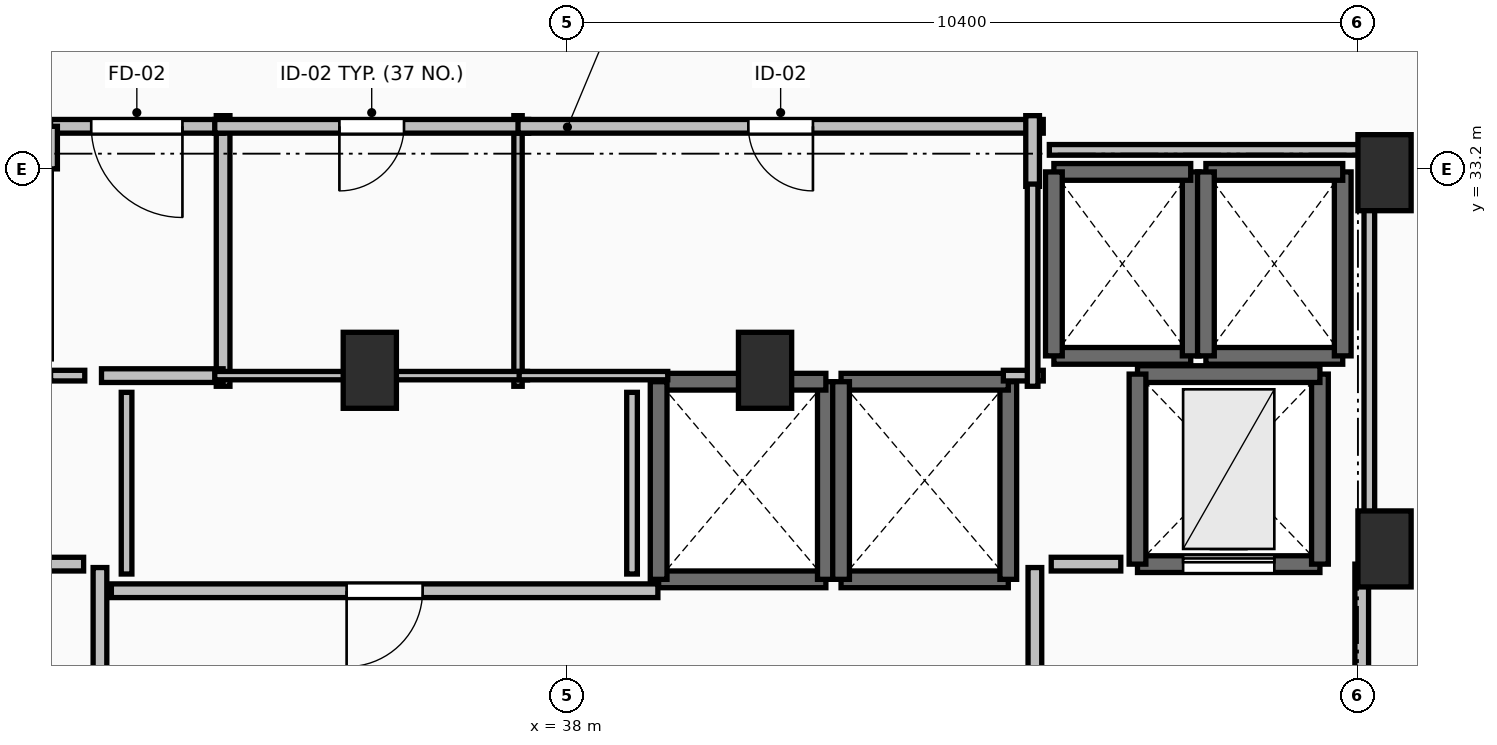
"""IFC4 building model, lengths in metres.
Left out: names, types, materials, properties, quantities, classifications, styles, units other than length and angle.
Written with IfcOpenShell. Run it as: python <this file> out.ifc"""

import sys

from ifc_helpers import new_model, si_unit, direction, frame, frame_2d, origin, origin_2d, place, context, subcontext, project, spatial, rectangle, extrude, element, fill, save


model = new_model("IFC4")
c1 = context("Model", 3, precision=1e-05, world=origin(), true_north=direction((0.0, 1.0)))
c2 = subcontext(c1, "Body", "Model", "MODEL_VIEW")
j1 = project(units=[si_unit("LENGTHUNIT", "METRE"), si_unit("PLANEANGLEUNIT", "RADIAN")], contexts=[c1])
p1 = place(None, origin())
s1 = spatial("IfcSite", under=j1, at=p1, CompositionType="ELEMENT")
p2 = place(p1, origin())
s2 = spatial("IfcBuilding", under=s1, at=p2, CompositionType="ELEMENT")
p3 = place(p2, frame((0.0, 0.0, 179.1)))
s3 = spatial("IfcBuildingStorey", under=s2, at=p3, CompositionType="ELEMENT", Elevation=179.1)
for number, where, z_axis, x_axis in (
    (1, (48.75, 33.15, 0.0), (0.0, 0.0, 1.0), (1.0, 0.0, 0.0)),
    (2, (48.75, 28.2, 0.0), (0.0, 0.0, 1.0), (1.0, 0.0, 0.0)),
    (3, (35.4, 30.55, 0.0), (0.0, 0.0, 1.0), (1.0, 0.0, 0.0)),
    (4, (40.6, 30.55, 0.0), (0.0, 0.0, 1.0), (1.0, 0.0, 0.0)),
):
    element("IfcColumn", number, at=place(p3, frame(where, z_axis=z_axis, x_axis=x_axis)), inside=s3, PredefinedType="PILASTER", context=c2, shape_type="SweptSolid", body=[
        extrude(rectangle(XDim=0.7, YDim=1.0, at=origin_2d()), origin(), (0.0, 0.0, 1.0), 3.5),
    ])
p4 = place(p3, frame((39.2, 27.8, 0.0), z_axis=(0.0, 0.0, 1.0), x_axis=(1.0, 0.0, 0.0)))
e5 = element("IfcWall", 5, at=p4, inside=s3, PredefinedType="SOLIDWALL", context=c2, shape_type="SweptSolid", body=[
    extrude(rectangle(XDim=2.2, YDim=0.22, at=frame_2d((1.1, 0.0))), origin(), (0.0, 0.0, 1.0), 3.24),
])
p5 = place(p3, frame((41.4, 27.8, 0.0), z_axis=(0.0, 0.0, 1.0), x_axis=(0.0, 1.0, 0.0)))
e6 = element("IfcWall", 6, at=p5, inside=s3, PredefinedType="SOLIDWALL", context=c2, shape_type="SweptSolid", body=[
    extrude(rectangle(XDim=2.6, YDim=0.22, at=frame_2d((1.3, 0.0))), origin(), (0.0, 0.0, 1.0), 3.24),
])
p6 = place(p3, frame((41.4, 30.4, 0.0), z_axis=(0.0, 0.0, 1.0), x_axis=(-1.0, 0.0, 0.0)))
e7 = element("IfcWall", 7, at=p6, inside=s3, PredefinedType="SOLIDWALL", context=c2, shape_type="SweptSolid", body=[
    extrude(rectangle(XDim=2.2, YDim=0.22, at=frame_2d((1.1, 0.0))), origin(), (0.0, 0.0, 1.0), 3.24),
])
p7 = place(p3, frame((39.2, 30.4, 0.0), z_axis=(0.0, 0.0, 1.0), x_axis=(0.0, -1.0, 0.0)))
e8 = element("IfcWall", 8, at=p7, inside=s3, PredefinedType="SOLIDWALL", context=c2, shape_type="SweptSolid", body=[
    extrude(rectangle(XDim=2.6, YDim=0.22, at=frame_2d((1.3, 0.0))), origin(), (0.0, 0.0, 1.0), 3.24),
])
p8 = place(p3, frame((41.6, 27.8, 0.0), z_axis=(0.0, 0.0, 1.0), x_axis=(1.0, 0.0, 0.0)))
e9 = element("IfcWall", 9, at=p8, inside=s3, PredefinedType="SOLIDWALL", context=c2, shape_type="SweptSolid", body=[
    extrude(rectangle(XDim=2.2, YDim=0.22, at=frame_2d((1.1, 0.0))), origin(), (0.0, 0.0, 1.0), 3.24),
])
p9 = place(p3, frame((43.8, 27.8, 0.0), z_axis=(0.0, 0.0, 1.0), x_axis=(0.0, 1.0, 0.0)))
e10 = element("IfcWall", 10, at=p9, inside=s3, PredefinedType="SOLIDWALL", context=c2, shape_type="SweptSolid", body=[
    extrude(rectangle(XDim=2.6, YDim=0.22, at=frame_2d((1.3, 0.0))), origin(), (0.0, 0.0, 1.0), 3.24),
])
p10 = place(p3, frame((43.8, 30.4, 0.0), z_axis=(0.0, 0.0, 1.0), x_axis=(-1.0, 0.0, 0.0)))
e11 = element("IfcWall", 11, at=p10, inside=s3, PredefinedType="SOLIDWALL", context=c2, shape_type="SweptSolid", body=[
    extrude(rectangle(XDim=2.2, YDim=0.22, at=frame_2d((1.1, 0.0))), origin(), (0.0, 0.0, 1.0), 3.24),
])
p11 = place(p3, frame((41.6, 30.4, 0.0), z_axis=(0.0, 0.0, 1.0), x_axis=(0.0, -1.0, 0.0)))
e12 = element("IfcWall", 12, at=p11, inside=s3, PredefinedType="SOLIDWALL", context=c2, shape_type="SweptSolid", body=[
    extrude(rectangle(XDim=2.6, YDim=0.22, at=frame_2d((1.3, 0.0))), origin(), (0.0, 0.0, 1.0), 3.24),
])
p12 = place(p3, frame((44.4, 30.74, 0.0), z_axis=(0.0, 0.0, 1.0), x_axis=(1.0, 0.0, 0.0)))
e13 = element("IfcWall", 13, at=p12, inside=s3, PredefinedType="SOLIDWALL", context=c2, shape_type="SweptSolid", body=[
    extrude(rectangle(XDim=1.8, YDim=0.22, at=frame_2d((0.9, 0.0))), origin(), (0.0, 0.0, 1.0), 3.24),
])
p13 = place(p3, frame((46.2, 30.74, 0.0), z_axis=(0.0, 0.0, 1.0), x_axis=(0.0, 1.0, 0.0)))
e14 = element("IfcWall", 14, at=p13, inside=s3, PredefinedType="SOLIDWALL", context=c2, shape_type="SweptSolid", body=[
    extrude(rectangle(XDim=2.42, YDim=0.22, at=frame_2d((1.21, 0.0))), origin(), (0.0, 0.0, 1.0), 3.24),
])
p14 = place(p3, frame((46.2, 33.16, 0.0), z_axis=(0.0, 0.0, 1.0), x_axis=(-1.0, 0.0, 0.0)))
e15 = element("IfcWall", 15, at=p14, inside=s3, PredefinedType="SOLIDWALL", context=c2, shape_type="SweptSolid", body=[
    extrude(rectangle(XDim=1.8, YDim=0.22, at=frame_2d((0.9, 0.0))), origin(), (0.0, 0.0, 1.0), 3.24),
])
p15 = place(p3, frame((44.4, 33.16, 0.0), z_axis=(0.0, 0.0, 1.0), x_axis=(0.0, -1.0, 0.0)))
e16 = element("IfcWall", 16, at=p15, inside=s3, PredefinedType="SOLIDWALL", context=c2, shape_type="SweptSolid", body=[
    extrude(rectangle(XDim=2.42, YDim=0.22, at=frame_2d((1.21, 0.0))), origin(), (0.0, 0.0, 1.0), 3.24),
])
p16 = place(p3, frame((46.4, 30.74, 0.0), z_axis=(0.0, 0.0, 1.0), x_axis=(1.0, 0.0, 0.0)))
e17 = element("IfcWall", 17, at=p16, inside=s3, PredefinedType="SOLIDWALL", context=c2, shape_type="SweptSolid", body=[
    extrude(rectangle(XDim=1.8, YDim=0.22, at=frame_2d((0.9, 0.0))), origin(), (0.0, 0.0, 1.0), 3.24),
])
p17 = place(p3, frame((48.2, 30.74, 0.0), z_axis=(0.0, 0.0, 1.0), x_axis=(0.0, 1.0, 0.0)))
e18 = element("IfcWall", 18, at=p17, inside=s3, PredefinedType="SOLIDWALL", context=c2, shape_type="SweptSolid", body=[
    extrude(rectangle(XDim=2.42, YDim=0.22, at=frame_2d((1.21, 0.0))), origin(), (0.0, 0.0, 1.0), 3.24),
])
p18 = place(p3, frame((48.2, 33.16, 0.0), z_axis=(0.0, 0.0, 1.0), x_axis=(-1.0, 0.0, 0.0)))
e19 = element("IfcWall", 19, at=p18, inside=s3, PredefinedType="SOLIDWALL", context=c2, shape_type="SweptSolid", body=[
    extrude(rectangle(XDim=1.8, YDim=0.22, at=frame_2d((0.9, 0.0))), origin(), (0.0, 0.0, 1.0), 3.24),
])
p19 = place(p3, frame((46.4, 33.16, 0.0), z_axis=(0.0, 0.0, 1.0), x_axis=(0.0, -1.0, 0.0)))
e20 = element("IfcWall", 20, at=p19, inside=s3, PredefinedType="SOLIDWALL", context=c2, shape_type="SweptSolid", body=[
    extrude(rectangle(XDim=2.42, YDim=0.22, at=frame_2d((1.21, 0.0))), origin(), (0.0, 0.0, 1.0), 3.24),
])
p20 = place(p3, frame((45.5, 28.0, 0.0), z_axis=(0.0, 0.0, 1.0), x_axis=(1.0, 0.0, 0.0)))
e21 = element("IfcWall", 21, at=p20, inside=s3, PredefinedType="SHEAR", context=c2, shape_type="SweptSolid", body=[
    extrude(rectangle(XDim=2.4, YDim=0.22, at=frame_2d((1.2, 0.0))), origin(), (0.0, 0.0, 1.0), 3.24),
])
p21 = place(p20, frame((0.6, 0.0, 0.0)))
e22 = element("IfcOpeningElement", 22, at=p21, cuts=e21, PredefinedType="OPENING", context=c2, shape_type="SweptSolid", body=[
    extrude(rectangle(XDim=1.2, YDim=2.2, at=frame_2d((0.6, 1.1))), frame((0.0, 0.125, 0.0), z_axis=(0.0, -1.0, 0.0), x_axis=(1.0, 0.0, 0.0)), (0.0, 0.0, 1.0), 0.25),
])
p22 = place(p3, frame((47.9, 28.0, 0.0), z_axis=(0.0, 0.0, 1.0), x_axis=(0.0, 1.0, 0.0)))
e23 = element("IfcWall", 23, at=p22, inside=s3, PredefinedType="SHEAR", context=c2, shape_type="SweptSolid", body=[
    extrude(rectangle(XDim=2.5, YDim=0.22, at=frame_2d((1.25, 0.0))), origin(), (0.0, 0.0, 1.0), 3.24),
])
p23 = place(p3, frame((47.9, 30.5, 0.0), z_axis=(0.0, 0.0, 1.0), x_axis=(-1.0, 0.0, 0.0)))
e24 = element("IfcWall", 24, at=p23, inside=s3, PredefinedType="SHEAR", context=c2, shape_type="SweptSolid", body=[
    extrude(rectangle(XDim=2.4, YDim=0.22, at=frame_2d((1.2, 0.0))), origin(), (0.0, 0.0, 1.0), 3.24),
])
p24 = place(p3, frame((45.5, 30.5, 0.0), z_axis=(0.0, 0.0, 1.0), x_axis=(0.0, -1.0, 0.0)))
e25 = element("IfcWall", 25, at=p24, inside=s3, PredefinedType="SHEAR", context=c2, shape_type="SweptSolid", body=[
    extrude(rectangle(XDim=2.5, YDim=0.22, at=frame_2d((1.25, 0.0))), origin(), (0.0, 0.0, 1.0), 3.24),
])
p25 = place(p3, frame((31.85, 24.045, 0.0), z_axis=(0.0, 0.0, 1.0), x_axis=(0.0, 1.0, 0.0)))
e26 = element("IfcWall", 26, at=p25, inside=s3, PredefinedType="PARTITIONING", context=c2, shape_type="SweptSolid", body=[
    extrude(rectangle(XDim=3.91, YDim=0.18, at=frame_2d((1.955, 0.0))), origin(), (0.0, 0.0, 1.0), 3.24),
])
p26 = place(p25, frame((1.355, 0.0, 0.0)))
e27 = element("IfcOpeningElement", 27, at=p26, cuts=e26, PredefinedType="OPENING", context=c2, shape_type="SweptSolid", body=[
    extrude(rectangle(XDim=1.2, YDim=2.15, at=frame_2d((0.6, 1.075))), frame((0.0, 0.105, 0.0), z_axis=(0.0, -1.0, 0.0), x_axis=(1.0, 0.0, 0.0)), (0.0, 0.0, 1.0), 0.21),
])
p27 = place(p3, frame((44.15, 27.955, 0.0), z_axis=(0.0, 0.0, 1.0), x_axis=(0.0, -1.0, 0.0)))
e28 = element("IfcWall", 28, at=p27, inside=s3, PredefinedType="PARTITIONING", context=c2, shape_type="SweptSolid", body=[
    extrude(rectangle(XDim=3.91, YDim=0.18, at=frame_2d((1.955, 0.0))), origin(), (0.0, 0.0, 1.0), 3.24),
])
p28 = place(p27, frame((1.355, 0.0, 0.0)))
e29 = element("IfcOpeningElement", 29, at=p28, cuts=e28, PredefinedType="OPENING", context=c2, shape_type="SweptSolid", body=[
    extrude(rectangle(XDim=1.2, YDim=2.15, at=frame_2d((0.6, 1.075))), frame((0.0, 0.105, 0.0), z_axis=(0.0, -1.0, 0.0), x_axis=(1.0, 0.0, 0.0)), (0.0, 0.0, 1.0), 0.21),
])
p29 = place(p3, frame((48.45, 23.95, 0.0), z_axis=(0.0, 0.0, 1.0), x_axis=(0.0, 1.0, 0.0)))
e30 = element("IfcWall", 30, at=p29, inside=s3, PredefinedType="PARTITIONING", context=c2, shape_type="SweptSolid", body=[
    extrude(rectangle(XDim=4.05, YDim=0.18, at=frame_2d((2.025, 0.0))), origin(), (0.0, 0.0, 1.0), 3.24),
])
p30 = place(p29, frame((1.425, 0.0, 0.0)))
e31 = element("IfcOpeningElement", 31, at=p30, cuts=e30, PredefinedType="OPENING", context=c2, shape_type="SweptSolid", body=[
    extrude(rectangle(XDim=1.2, YDim=2.15, at=frame_2d((0.6, 1.075))), frame((0.0, 0.105, 0.0), z_axis=(0.0, -1.0, 0.0), x_axis=(1.0, 0.0, 0.0)), (0.0, 0.0, 1.0), 0.21),
])
p31 = place(p3, frame((33.47, 30.34, 0.0), z_axis=(0.0, 0.0, 1.0), x_axis=(0.0, 1.0, 0.0)))
e32 = element("IfcWall", 32, at=p31, inside=s3, PredefinedType="PARTITIONING", context=c2, shape_type="SweptSolid", body=[
    extrude(rectangle(XDim=3.56, YDim=0.18, at=frame_2d((1.78, 0.0))), origin(), (0.0, 0.0, 1.0), 3.24),
])
p32 = place(p3, frame((31.87, 30.48, 0.0), z_axis=(0.0, 0.0, 1.0), x_axis=(1.0, 0.0, 0.0)))
e33 = element("IfcWall", 33, at=p32, inside=s3, PredefinedType="PARTITIONING", context=c2, shape_type="SweptSolid", body=[
    extrude(rectangle(XDim=1.6, YDim=0.18, at=frame_2d((0.8, 0.0))), origin(), (0.0, 0.0, 1.0), 3.24),
])
p33 = place(p3, frame((33.47, 33.76, 0.0), z_axis=(0.0, 0.0, 1.0), x_axis=(-1.0, 0.0, 0.0)))
e34 = element("IfcWall", 34, at=p33, inside=s3, PredefinedType="PARTITIONING", context=c2, shape_type="SweptSolid", body=[
    extrude(rectangle(XDim=2.27, YDim=0.18, at=frame_2d((1.135, 0.0))), origin(), (0.0, 0.0, 1.0), 3.24),
])
p34 = place(p33, frame((0.535, 0.0, 0.0)))
e35 = element("IfcOpeningElement", 35, at=p34, cuts=e34, PredefinedType="OPENING", context=c2, shape_type="SweptSolid", body=[
    extrude(rectangle(XDim=1.2, YDim=2.15, at=frame_2d((0.6, 1.075))), frame((0.0, 0.105, 0.0), z_axis=(0.0, -1.0, 0.0), x_axis=(1.0, 0.0, 0.0)), (0.0, 0.0, 1.0), 0.21),
])
p35 = place(p3, frame((31.2, 33.76, 0.0), z_axis=(0.0, 0.0, 1.0), x_axis=(0.0, -1.0, 0.0)))
e36 = element("IfcWall", 36, at=p35, inside=s3, PredefinedType="PARTITIONING", context=c2, shape_type="SweptSolid", body=[
    extrude(rectangle(XDim=0.56, YDim=0.18, at=frame_2d((0.28, 0.0))), origin(), (0.0, 0.0, 1.0), 3.24),
])
p36 = place(p3, frame((39.19, 27.65, 0.0), z_axis=(0.0, 0.0, 1.0), x_axis=(-1.0, 0.0, 0.0)))
e37 = element("IfcWall", 37, at=p36, inside=s3, PredefinedType="PARTITIONING", context=c2, shape_type="SweptSolid", body=[
    extrude(rectangle(XDim=7.19, YDim=0.18, at=frame_2d((3.595, 0.0))), origin(), (0.0, 0.0, 1.0), 3.24),
])
p37 = place(p36, frame((3.095, 0.0, 0.0)))
e38 = element("IfcOpeningElement", 38, at=p37, cuts=e37, PredefinedType="OPENING", context=c2, shape_type="SweptSolid", body=[
    extrude(rectangle(XDim=1.0, YDim=2.15, at=frame_2d((0.5, 1.075))), frame((0.0, 0.105, 0.0), z_axis=(0.0, -1.0, 0.0), x_axis=(1.0, 0.0, 0.0)), (0.0, 0.0, 1.0), 0.21),
])
p38 = place(p3, frame((37.35, 30.34, 0.0), z_axis=(0.0, 0.0, 1.0), x_axis=(0.0, 1.0, 0.0)))
e39 = element("IfcWall", 39, at=p38, inside=s3, PredefinedType="PARTITIONING", context=c2, shape_type="SweptSolid", body=[
    extrude(rectangle(XDim=3.56, YDim=0.11, at=frame_2d((1.78, 0.0))), origin(), (0.0, 0.0, 1.0), 2.432),
])
p39 = place(p3, frame((33.36, 30.48, 0.0), z_axis=(0.0, 0.0, 1.0), x_axis=(1.0, 0.0, 0.0)))
e40 = element("IfcWall", 40, at=p39, inside=s3, PredefinedType="PARTITIONING", context=c2, shape_type="SweptSolid", body=[
    extrude(rectangle(XDim=4.115, YDim=0.11, at=frame_2d((2.058, 0.0))), origin(), (0.0, 0.0, 1.0), 2.432),
])
p40 = place(p3, frame((37.49, 33.76, 0.0), z_axis=(0.0, 0.0, 1.0), x_axis=(-1.0, 0.0, 0.0)))
e41 = element("IfcWall", 41, at=p40, inside=s3, PredefinedType="PARTITIONING", context=c2, shape_type="SweptSolid", body=[
    extrude(rectangle(XDim=4.13, YDim=0.18, at=frame_2d((2.065, 0.0))), origin(), (0.0, 0.0, 1.0), 3.24),
])
p41 = place(p40, frame((1.64, 0.0, 0.0)))
e42 = element("IfcOpeningElement", 42, at=p41, cuts=e41, PredefinedType="OPENING", context=c2, shape_type="SweptSolid", body=[
    extrude(rectangle(XDim=0.85, YDim=2.1, at=frame_2d((0.425, 1.05))), frame((0.0, 0.105, 0.0), z_axis=(0.0, -1.0, 0.0), x_axis=(1.0, 0.0, 0.0)), (0.0, 0.0, 1.0), 0.21),
])
p42 = place(p3, frame((37.365, 30.48, 0.0), z_axis=(0.0, 0.0, 1.0), x_axis=(1.0, 0.0, 0.0)))
e43 = element("IfcWall", 43, at=p42, inside=s3, PredefinedType="PARTITIONING", context=c2, shape_type="SweptSolid", body=[
    extrude(rectangle(XDim=1.955, YDim=0.11, at=frame_2d((0.978, 0.0))), origin(), (0.0, 0.0, 1.0), 2.432),
])
p43 = place(p3, frame((44.26, 33.76, 0.0), z_axis=(0.0, 0.0, 1.0), x_axis=(-1.0, 0.0, 0.0)))
e44 = element("IfcWall", 44, at=p43, inside=s3, PredefinedType="PARTITIONING", context=c2, shape_type="SweptSolid", body=[
    extrude(rectangle(XDim=6.91, YDim=0.18, at=frame_2d((3.455, 0.0))), origin(), (0.0, 0.0, 1.0), 3.24),
])
p44 = place(p43, frame((3.03, 0.0, 0.0)))
e45 = element("IfcOpeningElement", 45, at=p44, cuts=e44, PredefinedType="OPENING", context=c2, shape_type="SweptSolid", body=[
    extrude(rectangle(XDim=0.85, YDim=2.1, at=frame_2d((0.425, 1.05))), frame((0.0, 0.105, 0.0), z_axis=(0.0, -1.0, 0.0), x_axis=(1.0, 0.0, 0.0)), (0.0, 0.0, 1.0), 0.21),
])
p45 = place(p3, frame((44.12, 32.97, 0.0), z_axis=(0.0, 0.0, 1.0), x_axis=(0.0, 1.0, 0.0)))
e46 = element("IfcWall", 46, at=p45, inside=s3, PredefinedType="PARTITIONING", context=c2, shape_type="SweptSolid", body=[
    extrude(rectangle(XDim=0.93, YDim=0.18, at=frame_2d((0.465, 0.0))), origin(), (0.0, 0.0, 1.0), 3.24),
])
for number, where, z_axis, x_axis in (
    (47, (31.635, 28.0, 0.0), (0.0, 0.0, 1.0), (-1.0, 0.0, 0.0)),
    (48, (45.28, 28.0, 0.0), (0.0, 0.0, 1.0), (-1.0, 0.0, 0.0)),
):
    element("IfcWall", number, at=place(p3, frame(where, z_axis=z_axis, x_axis=x_axis)), inside=s3, PredefinedType="PARTITIONING", context=c2, shape_type="SweptSolid", body=[
        extrude(rectangle(XDim=0.915, YDim=0.18, at=frame_2d((0.458, 0.0))), origin(), (0.0, 0.0, 1.0), 3.24),
    ])
p46 = place(p3, frame((31.2, 30.48, 0.0), z_axis=(0.0, 0.0, 1.0), x_axis=(1.0, 0.0, 0.0)))
e49 = element("IfcWall", 49, at=p46, inside=s3, PredefinedType="PARTITIONING", context=c2, shape_type="SweptSolid", body=[
    extrude(rectangle(XDim=0.45, YDim=0.14, at=frame_2d((0.225, 0.0))), origin(), (0.0, 0.0, 1.0), 3.24),
])
p47 = place(p3, frame((43.735, 30.48, 0.0), z_axis=(0.0, 0.0, 1.0), x_axis=(1.0, 0.0, 0.0)))
e50 = element("IfcWall", 50, at=p47, inside=s3, PredefinedType="PARTITIONING", context=c2, shape_type="SweptSolid", body=[
    extrude(rectangle(XDim=0.525, YDim=0.14, at=frame_2d((0.262, 0.0))), origin(), (0.0, 0.0, 1.0), 3.24),
])
p48 = place(p3, frame((44.12, 30.34, 0.0), z_axis=(0.0, 0.0, 1.0), x_axis=(0.0, 1.0, 0.0)))
e51 = element("IfcWall", 51, at=p48, inside=s3, PredefinedType="PARTITIONING", context=c2, shape_type="SweptSolid", body=[
    extrude(rectangle(XDim=2.66, YDim=0.14, at=frame_2d((1.33, 0.0))), origin(), (0.0, 0.0, 1.0), 3.24),
])
for number, where, z_axis, x_axis in (
    (52, (32.2, 30.26, 0.0), (0.0, 0.0, 1.0), (0.0, -1.0, 0.0)),
    (53, (38.85, 27.87, 0.0), (0.0, 0.0, 1.0), (0.0, 1.0, 0.0)),
):
    element("IfcWall", number, at=place(p3, frame(where, z_axis=z_axis, x_axis=x_axis)), inside=s3, PredefinedType="PARTITIONING", context=c2, shape_type="SweptSolid", body=[
        extrude(rectangle(XDim=2.39, YDim=0.14, at=frame_2d((1.195, 0.0))), origin(), (0.0, 0.0, 1.0), 3.24),
    ])
p49 = place(p3, frame((48.55, 28.196, 0.0), z_axis=(0.0, 0.0, 1.0), x_axis=(0.0, 1.0, 0.0)))
e54 = element("IfcWall", 54, at=p49, inside=s3, PredefinedType="PARTITIONING", context=c2, shape_type="SweptSolid", body=[
    extrude(rectangle(XDim=5.254, YDim=0.14, at=frame_2d((2.627, 0.0))), origin(), (0.0, 0.0, 1.0), 2.432),
])
p50 = place(p3, frame((48.55, 33.45, 0.0), z_axis=(0.0, 0.0, 1.0), x_axis=(-1.0, 0.0, 0.0)))
e55 = element("IfcWall", 55, at=p50, inside=s3, PredefinedType="PARTITIONING", context=c2, shape_type="SweptSolid", body=[
    extrude(rectangle(XDim=4.21, YDim=0.14, at=frame_2d((2.105, 0.0))), origin(), (0.0, 0.0, 1.0), 2.432),
])
p51 = place(p21, origin())
e56 = element("IfcDoor", 56, at=p51, inside=s3, OperationType="SLIDING_TO_LEFT", PredefinedType="DOOR", context=c2, shape_type="SweptSolid", body=[
    extrude(rectangle(XDim=1.2, YDim=2.2, at=frame_2d((0.6, 1.1))), frame((0.0, 0.025, 0.0), z_axis=(0.0, -1.0, 0.0), x_axis=(1.0, 0.0, 0.0)), (0.0, 0.0, 1.0), 0.05),
])
fill(e22, e56)
p52 = place(p34, origin())
e57 = element("IfcDoor", 57, at=p52, inside=s3, OperationType="SINGLE_SWING_LEFT", PredefinedType="DOOR", context=c2, shape_type="SweptSolid", body=[
    extrude(rectangle(XDim=1.2, YDim=2.15, at=frame_2d((0.6, 1.075))), frame((0.0, 0.025, 0.0), z_axis=(0.0, -1.0, 0.0), x_axis=(1.0, 0.0, 0.0)), (0.0, 0.0, 1.0), 0.05),
])
fill(e35, e57)
p53 = place(p37, origin())
e58 = element("IfcDoor", 58, at=p53, inside=s3, OperationType="SINGLE_SWING_RIGHT", PredefinedType="DOOR", context=c2, shape_type="SweptSolid", body=[
    extrude(rectangle(XDim=1.0, YDim=2.15, at=frame_2d((0.5, 1.075))), frame((0.0, 0.025, 0.0), z_axis=(0.0, -1.0, 0.0), x_axis=(1.0, 0.0, 0.0)), (0.0, 0.0, 1.0), 0.05),
])
fill(e38, e58)
p54 = place(p41, origin())
e59 = element("IfcDoor", 59, at=p54, inside=s3, OperationType="SINGLE_SWING_RIGHT", PredefinedType="DOOR", context=c2, shape_type="SweptSolid", body=[
    extrude(rectangle(XDim=0.85, YDim=2.1, at=frame_2d((0.425, 1.05))), frame((0.0, 0.025, 0.0), z_axis=(0.0, -1.0, 0.0), x_axis=(1.0, 0.0, 0.0)), (0.0, 0.0, 1.0), 0.05),
])
fill(e42, e59)
p55 = place(p44, origin())
e60 = element("IfcDoor", 60, at=p55, inside=s3, OperationType="SINGLE_SWING_LEFT", PredefinedType="DOOR", context=c2, shape_type="SweptSolid", body=[
    extrude(rectangle(XDim=0.85, YDim=2.1, at=frame_2d((0.425, 1.05))), frame((0.0, 0.025, 0.0), z_axis=(0.0, -1.0, 0.0), x_axis=(1.0, 0.0, 0.0)), (0.0, 0.0, 1.0), 0.05),
])
fill(e45, e60)
save(model, sys.argv[1])
